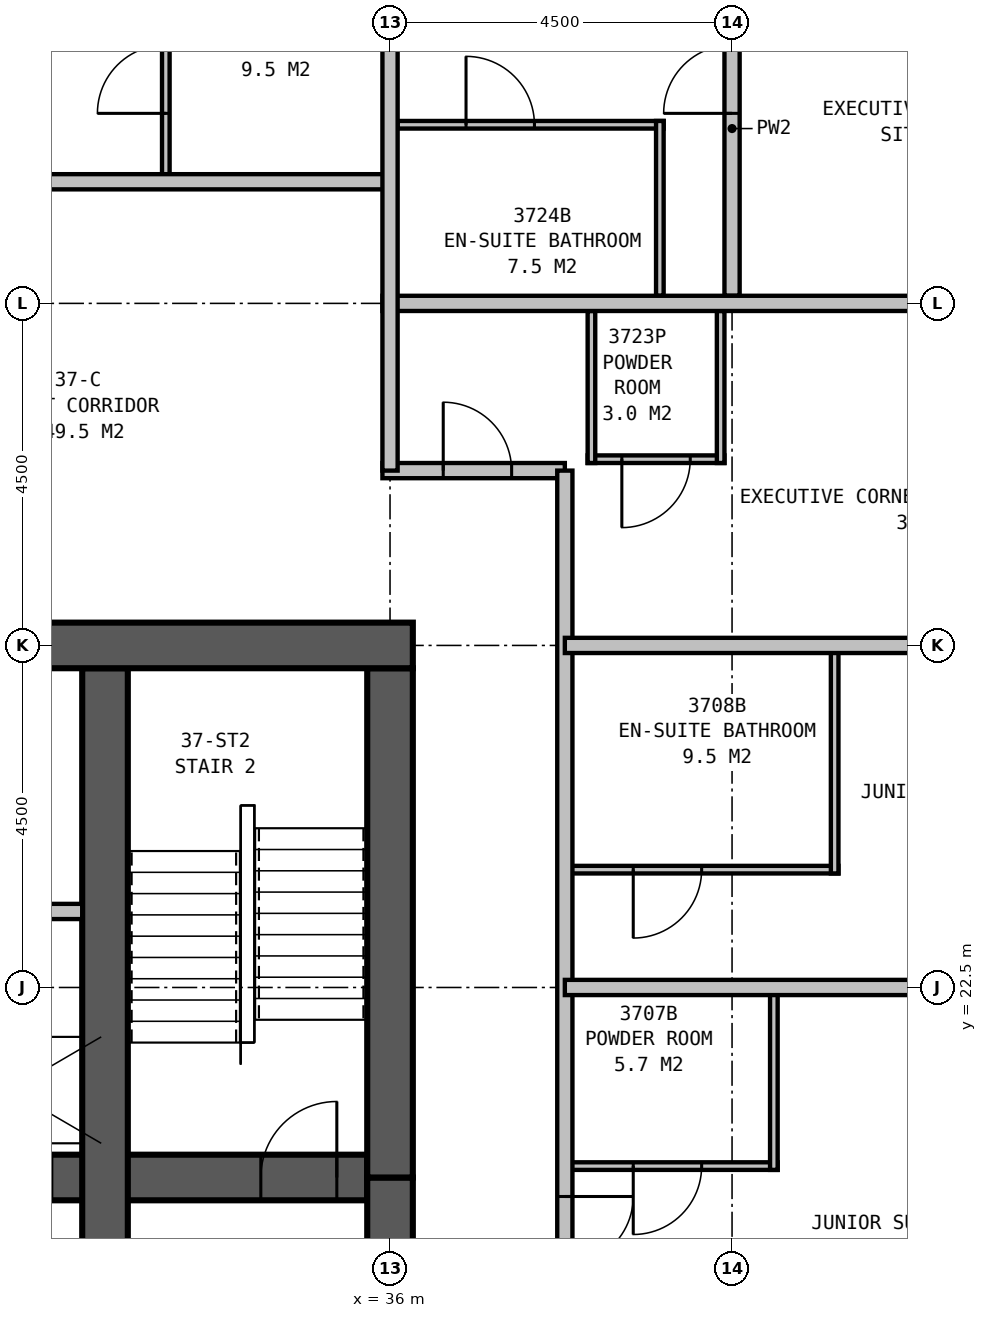
"""IFC4 building model, lengths in metres.
Left out: names, types, materials, properties, quantities, classifications, styles, units other than length and angle.
Written with IfcOpenShell. Run it as: python <this file> out.ifc"""

import sys

from ifc_helpers import new_model, si_unit, direction, frame, frame_2d, origin, place, context, subcontext, project, spatial, rectangle, extrude, element, fill, save


model = new_model("IFC4")
c1 = context("Model", 3, precision=1e-05, world=origin(), true_north=direction((0.0, 1.0)))
c2 = subcontext(c1, "Body", "Model", "MODEL_VIEW")
j1 = project(units=[si_unit("LENGTHUNIT", "METRE"), si_unit("PLANEANGLEUNIT", "RADIAN")], contexts=[c1])
p1 = place(None, origin())
s1 = spatial("IfcSite", under=j1, at=p1, CompositionType="ELEMENT")
p2 = place(p1, origin())
s2 = spatial("IfcBuilding", under=s1, at=p2, CompositionType="ELEMENT")
p3 = place(p2, frame((0.0, 0.0, 142.4)))
s3 = spatial("IfcBuildingStorey", under=s2, at=p3, CompositionType="ELEMENT", Elevation=142.4)
p4 = place(p3, frame((36.3, 27.0, 0.0), z_axis=(0.0, 0.0, 1.0), x_axis=(-1.0, 0.0, 0.0)))
e1 = element("IfcWall", 1, at=p4, inside=s3, PredefinedType="SHEAR", context=c2, shape_type="SweptSolid", body=[
    extrude(rectangle(XDim=23.1, YDim=0.6, at=frame_2d((11.55, 0.0))), origin(), (0.0, 0.0, 1.0), 3.5),
])
p5 = place(p4, frame((17.05, 0.0, 0.0)))
e2 = element("IfcOpeningElement", 2, at=p5, cuts=e1, PredefinedType="OPENING", context=c2, shape_type="SweptSolid", body=[
    extrude(rectangle(XDim=1.0, YDim=2.1, at=frame_2d((0.5, 1.05))), frame((0.0, 0.31, 0.0), z_axis=(0.0, -1.0, 0.0), x_axis=(1.0, 0.0, 0.0)), (0.0, 0.0, 1.0), 0.62),
])
p6 = place(p4, frame((12.05, 0.0, 0.0)))
e3 = element("IfcOpeningElement", 3, at=p6, cuts=e1, PredefinedType="OPENING", context=c2, shape_type="SweptSolid", body=[
    extrude(rectangle(XDim=1.0, YDim=2.1, at=frame_2d((0.5, 1.05))), frame((0.0, 0.31, 0.0), z_axis=(0.0, -1.0, 0.0), x_axis=(1.0, 0.0, 0.0)), (0.0, 0.0, 1.0), 0.62),
])
p7 = place(p4, frame((7.05, 0.0, 0.0)))
e4 = element("IfcOpeningElement", 4, at=p7, cuts=e1, PredefinedType="OPENING", context=c2, shape_type="SweptSolid", body=[
    extrude(rectangle(XDim=1.0, YDim=2.1, at=frame_2d((0.5, 1.05))), frame((0.0, 0.31, 0.0), z_axis=(0.0, -1.0, 0.0), x_axis=(1.0, 0.0, 0.0)), (0.0, 0.0, 1.0), 0.62),
])
p8 = place(p3, frame((32.25, 13.8, 0.0), z_axis=(0.0, 0.0, 1.0), x_axis=(0.0, 1.0, 0.0)))
e5 = element("IfcWall", 5, at=p8, inside=s3, PredefinedType="SHEAR", context=c2, shape_type="SweptSolid", body=[
    extrude(rectangle(XDim=12.9, YDim=0.6, at=frame_2d((6.45, 0.0))), origin(), (0.0, 0.0, 1.0), 3.5),
])
p9 = place(p8, frame((5.05, 0.0, 0.0), z_axis=(0.0, 0.0, 1.0), x_axis=(-1.0, 0.0, 0.0)))
e6 = element("IfcOpeningElement", 6, at=p9, cuts=e5, PredefinedType="OPENING", context=c2, shape_type="SweptSolid", body=[
    extrude(rectangle(XDim=1.2, YDim=2.1, at=frame_2d((0.6, 1.05))), frame((0.0, 0.31, 0.0), z_axis=(0.0, -1.0, 0.0), x_axis=(1.0, 0.0, 0.0)), (0.0, 0.0, 1.0), 0.62),
])
p10 = place(p3, frame((13.8, 20.0, 0.0), z_axis=(0.0, 0.0, 1.0), x_axis=(1.0, 0.0, 0.0)))
e7 = element("IfcWall", 7, at=p10, inside=s3, PredefinedType="SHEAR", context=c2, shape_type="SweptSolid", body=[
    extrude(rectangle(XDim=21.9, YDim=0.6, at=frame_2d((10.95, 0.0))), origin(), (0.0, 0.0, 1.0), 3.5),
])
p11 = place(p10, frame((0.5, 0.0, 0.0)))
e8 = element("IfcOpeningElement", 8, at=p11, cuts=e7, PredefinedType="OPENING", context=c2, shape_type="SweptSolid", body=[
    extrude(rectangle(XDim=1.0, YDim=2.1, at=frame_2d((0.5, 1.05))), frame((0.0, 0.31, 0.0), z_axis=(0.0, -1.0, 0.0), x_axis=(1.0, 0.0, 0.0)), (0.0, 0.0, 1.0), 0.62),
])
p12 = place(p10, frame((20.5, 0.0, 0.0)))
e9 = element("IfcOpeningElement", 9, at=p12, cuts=e7, PredefinedType="OPENING", context=c2, shape_type="SweptSolid", body=[
    extrude(rectangle(XDim=1.0, YDim=2.1, at=frame_2d((0.5, 1.05))), frame((0.0, 0.31, 0.0), z_axis=(0.0, -1.0, 0.0), x_axis=(1.0, 0.0, 0.0)), (0.0, 0.0, 1.0), 0.62),
])
p13 = place(p10, frame((16.65, 0.0, 0.0)))
e10 = element("IfcOpeningElement", 10, at=p13, cuts=e7, PredefinedType="OPENING", context=c2, shape_type="SweptSolid", body=[
    extrude(rectangle(XDim=1.1, YDim=2.1, at=frame_2d((0.55, 1.05))), frame((0.0, 0.31, 0.0), z_axis=(0.0, -1.0, 0.0), x_axis=(1.0, 0.0, 0.0)), (0.0, 0.0, 1.0), 0.62),
])
p14 = place(p3, frame((36.0, 16.5, 0.0), z_axis=(0.0, 0.0, 1.0), x_axis=(0.0, 1.0, 0.0)))
e11 = element("IfcWall", 11, at=p14, inside=s3, PredefinedType="SHEAR", context=c2, shape_type="SweptSolid", body=[
    extrude(rectangle(XDim=3.5, YDim=0.6, at=frame_2d((1.75, 0.0))), origin(), (0.0, 0.0, 1.0), 3.5),
])
p15 = place(p14, frame((0.65, 0.0, 0.0)))
e12 = element("IfcOpeningElement", 12, at=p15, cuts=e11, PredefinedType="OPENING", context=c2, shape_type="SweptSolid", body=[
    extrude(rectangle(XDim=1.2, YDim=2.1, at=frame_2d((0.6, 1.05))), frame((0.0, 0.31, 0.0), z_axis=(0.0, -1.0, 0.0), x_axis=(1.0, 0.0, 0.0)), (0.0, 0.0, 1.0), 0.62),
])
p16 = place(p3, frame((36.0, 20.0, 0.0), z_axis=(0.0, 0.0, 1.0), x_axis=(0.0, 1.0, 0.0)))
e13 = element("IfcWall", 13, at=p16, inside=s3, PredefinedType="SHEAR", context=c2, shape_type="SweptSolid", body=[
    extrude(rectangle(XDim=6.7, YDim=0.6, at=frame_2d((3.35, 0.0))), origin(), (0.0, 0.0, 1.0), 3.5),
])
p17 = place(p3, frame((13.5, 33.1, 0.0), z_axis=(0.0, 0.0, 1.0), x_axis=(1.0, 0.0, 0.0)))
e14 = element("IfcWall", 14, at=p17, inside=s3, PredefinedType="PARTITIONING", context=c2, shape_type="SweptSolid", body=[
    extrude(rectangle(XDim=22.5, YDim=0.2, at=frame_2d((11.25, 0.0))), origin(), (0.0, 0.0, 1.0), 3.25),
])
p18 = place(p17, frame((0.85, 0.0, 0.0)))
e15 = element("IfcOpeningElement", 15, at=p18, cuts=e14, PredefinedType="OPENING", context=c2, shape_type="SweptSolid", body=[
    extrude(rectangle(XDim=0.9, YDim=2.1, at=frame_2d((0.45, 1.05))), frame((0.0, 0.11, 0.0), z_axis=(0.0, -1.0, 0.0), x_axis=(1.0, 0.0, 0.0)), (0.0, 0.0, 1.0), 0.22),
])
p19 = place(p17, frame((10.7, 0.0, 0.0)))
e16 = element("IfcOpeningElement", 16, at=p19, cuts=e14, PredefinedType="OPENING", context=c2, shape_type="SweptSolid", body=[
    extrude(rectangle(XDim=1.0, YDim=2.1, at=frame_2d((0.5, 1.05))), frame((0.0, 0.11, 0.0), z_axis=(0.0, -1.0, 0.0), x_axis=(1.0, 0.0, 0.0)), (0.0, 0.0, 1.0), 0.22),
])
p20 = place(p17, frame((15.15, 0.0, 0.0)))
e17 = element("IfcOpeningElement", 17, at=p20, cuts=e14, PredefinedType="OPENING", context=c2, shape_type="SweptSolid", body=[
    extrude(rectangle(XDim=0.9, YDim=2.1, at=frame_2d((0.45, 1.05))), frame((0.0, 0.11, 0.0), z_axis=(0.0, -1.0, 0.0), x_axis=(1.0, 0.0, 0.0)), (0.0, 0.0, 1.0), 0.22),
])
p21 = place(p3, frame((35.9, 29.3, 0.0), z_axis=(0.0, 0.0, 1.0), x_axis=(1.0, 0.0, 0.0)))
e18 = element("IfcWall", 18, at=p21, inside=s3, PredefinedType="PARTITIONING", context=c2, shape_type="SweptSolid", body=[
    extrude(rectangle(XDim=2.4, YDim=0.2, at=frame_2d((1.2, 0.0))), origin(), (0.0, 0.0, 1.0), 3.25),
])
p22 = place(p21, frame((0.8, 0.0, 0.0)))
e19 = element("IfcOpeningElement", 19, at=p22, cuts=e18, PredefinedType="OPENING", context=c2, shape_type="SweptSolid", body=[
    extrude(rectangle(XDim=0.9, YDim=2.1, at=frame_2d((0.45, 1.05))), frame((0.0, 0.11, 0.0), z_axis=(0.0, -1.0, 0.0), x_axis=(1.0, 0.0, 0.0)), (0.0, 0.0, 1.0), 0.22),
])
p23 = place(p3, frame((38.3, 11.2, 0.0), z_axis=(0.0, 0.0, 1.0), x_axis=(0.0, 1.0, 0.0)))
e20 = element("IfcWall", 20, at=p23, inside=s3, PredefinedType="PARTITIONING", context=c2, shape_type="SweptSolid", body=[
    extrude(rectangle(XDim=18.1, YDim=0.2, at=frame_2d((9.05, 0.0))), origin(), (0.0, 0.0, 1.0), 3.25),
])
p24 = place(p23, frame((5.0, 0.0, 0.0), z_axis=(0.0, 0.0, 1.0), x_axis=(-1.0, 0.0, 0.0)))
e21 = element("IfcOpeningElement", 21, at=p24, cuts=e20, PredefinedType="OPENING", context=c2, shape_type="SweptSolid", body=[
    extrude(rectangle(XDim=1.0, YDim=2.1, at=frame_2d((0.5, 1.05))), frame((0.0, 0.11, 0.0), z_axis=(0.0, -1.0, 0.0), x_axis=(1.0, 0.0, 0.0)), (0.0, 0.0, 1.0), 0.22),
])
p25 = place(p23, frame((8.55, 0.0, 0.0), z_axis=(0.0, 0.0, 1.0), x_axis=(-1.0, 0.0, 0.0)))
e22 = element("IfcOpeningElement", 22, at=p25, cuts=e20, PredefinedType="OPENING", context=c2, shape_type="SweptSolid", body=[
    extrude(rectangle(XDim=0.9, YDim=2.1, at=frame_2d((0.45, 1.05))), frame((0.0, 0.11, 0.0), z_axis=(0.0, -1.0, 0.0), x_axis=(1.0, 0.0, 0.0)), (0.0, 0.0, 1.0), 0.22),
])
p26 = place(p3, frame((38.3, 22.5, 0.0), z_axis=(0.0, 0.0, 1.0), x_axis=(1.0, 0.0, 0.0)))
e23 = element("IfcWall", 23, at=p26, inside=s3, PredefinedType="PARTITIONING", context=c2, shape_type="SweptSolid", body=[
    extrude(rectangle(XDim=8.699, YDim=0.2, at=frame_2d((4.35, 0.0))), origin(), (0.0, 0.0, 1.0), 2.2),
])
p27 = place(p26, frame((6.2, 0.0, 0.0)))
e24 = element("IfcOpeningElement", 24, at=p27, cuts=e23, PredefinedType="OPENING", context=c2, shape_type="SweptSolid", body=[
    extrude(rectangle(XDim=0.9, YDim=2.1, at=frame_2d((0.45, 1.05))), frame((0.0, 0.11, 0.0), z_axis=(0.0, -1.0, 0.0), x_axis=(1.0, 0.0, 0.0)), (0.0, 0.0, 1.0), 0.22),
])
p28 = place(p3, frame((41.05, 20.1, 0.0), z_axis=(0.0, 0.0, 1.0), x_axis=(0.0, 1.0, 0.0)))
e25 = element("IfcWall", 25, at=p28, inside=s3, PredefinedType="PLUMBINGWALL", context=c2, shape_type="SweptSolid", body=[
    extrude(rectangle(XDim=2.4, YDim=0.1, at=frame_2d((1.2, 0.0))), origin(), (0.0, 0.0, 1.0), 3.25),
])
p29 = place(p3, frame((38.3, 20.15, 0.0), z_axis=(0.0, 0.0, 1.0), x_axis=(1.0, 0.0, 0.0)))
e26 = element("IfcWall", 26, at=p29, inside=s3, PredefinedType="PLUMBINGWALL", context=c2, shape_type="SweptSolid", body=[
    extrude(rectangle(XDim=2.8, YDim=0.1, at=frame_2d((1.4, 0.0))), origin(), (0.0, 0.0, 1.0), 3.25),
])
p30 = place(p29, frame((1.8, 0.0, 0.0), z_axis=(0.0, 0.0, 1.0), x_axis=(-1.0, 0.0, 0.0)))
e27 = element("IfcOpeningElement", 27, at=p30, cuts=e26, PredefinedType="OPENING", context=c2, shape_type="SweptSolid", body=[
    extrude(rectangle(XDim=0.9, YDim=2.1, at=frame_2d((0.45, 1.05))), frame((0.0, 0.06, 0.0), z_axis=(0.0, -1.0, 0.0), x_axis=(1.0, 0.0, 0.0)), (0.0, 0.0, 1.0), 0.12),
])
p31 = place(p3, frame((41.85, 24.0, 0.0), z_axis=(0.0, 0.0, 1.0), x_axis=(0.0, 1.0, 0.0)))
e28 = element("IfcWall", 28, at=p31, inside=s3, PredefinedType="PLUMBINGWALL", context=c2, shape_type="SweptSolid", body=[
    extrude(rectangle(XDim=3.0, YDim=0.1, at=frame_2d((1.5, 0.0))), origin(), (0.0, 0.0, 1.0), 3.25),
])
p32 = place(p3, frame((38.3, 24.05, 0.0), z_axis=(0.0, 0.0, 1.0), x_axis=(1.0, 0.0, 0.0)))
e29 = element("IfcWall", 29, at=p32, inside=s3, PredefinedType="PLUMBINGWALL", context=c2, shape_type="SweptSolid", body=[
    extrude(rectangle(XDim=3.6, YDim=0.1, at=frame_2d((1.8, 0.0))), origin(), (0.0, 0.0, 1.0), 3.25),
])
p33 = place(p32, frame((1.8, 0.0, 0.0), z_axis=(0.0, 0.0, 1.0), x_axis=(-1.0, 0.0, 0.0)))
e30 = element("IfcOpeningElement", 30, at=p33, cuts=e29, PredefinedType="OPENING", context=c2, shape_type="SweptSolid", body=[
    extrude(rectangle(XDim=0.9, YDim=2.1, at=frame_2d((0.45, 1.05))), frame((0.0, 0.06, 0.0), z_axis=(0.0, -1.0, 0.0), x_axis=(1.0, 0.0, 0.0)), (0.0, 0.0, 1.0), 0.12),
])
p34 = place(p3, frame((33.05, 33.1, 0.0), z_axis=(0.0, 0.0, 1.0), x_axis=(0.0, 1.0, 0.0)))
e31 = element("IfcWall", 31, at=p34, inside=s3, PredefinedType="PLUMBINGWALL", context=c2, shape_type="SweptSolid", body=[
    extrude(rectangle(XDim=3.6, YDim=0.1, at=frame_2d((1.8, 0.0))), origin(), (0.0, 0.0, 1.0), 3.25),
])
p35 = place(p34, frame((0.9, 0.0, 0.0)))
e32 = element("IfcOpeningElement", 32, at=p35, cuts=e31, PredefinedType="OPENING", context=c2, shape_type="SweptSolid", body=[
    extrude(rectangle(XDim=0.9, YDim=2.1, at=frame_2d((0.45, 1.05))), frame((0.0, 0.06, 0.0), z_axis=(0.0, -1.0, 0.0), x_axis=(1.0, 0.0, 0.0)), (0.0, 0.0, 1.0), 0.12),
])
p36 = place(p3, frame((38.3, 27.0, 0.0), z_axis=(0.0, 0.0, 1.0), x_axis=(1.0, 0.0, 0.0)))
e33 = element("IfcWall", 33, at=p36, inside=s3, PredefinedType="PARTITIONING", context=c2, shape_type="SweptSolid", body=[
    extrude(rectangle(XDim=7.977, YDim=0.2, at=frame_2d((3.988, 0.0))), origin(), (0.0, 0.0, 1.0), 1.9),
])
p37 = place(p3, frame((36.0, 29.3, 0.0), z_axis=(0.0, 0.0, 1.0), x_axis=(0.0, 1.0, 0.0)))
e34 = element("IfcWall", 34, at=p37, inside=s3, PredefinedType="PARTITIONING", context=c2, shape_type="SweptSolid", body=[
    extrude(rectangle(XDim=11.2, YDim=0.2, at=frame_2d((5.6, 0.0))), origin(), (0.0, 0.0, 1.0), 2.2),
])
p38 = place(p3, frame((35.9, 31.5, 0.0), z_axis=(0.0, 0.0, 1.0), x_axis=(1.0, 0.0, 0.0)))
e35 = element("IfcWall", 35, at=p38, inside=s3, PredefinedType="PARTITIONING", context=c2, shape_type="SweptSolid", body=[
    extrude(rectangle(XDim=10.099, YDim=0.2, at=frame_2d((5.05, 0.0))), origin(), (0.0, 0.0, 1.0), 3.25),
])
p39 = place(p38, frame((8.099, 0.0, 0.0)))
e36 = element("IfcOpeningElement", 36, at=p39, cuts=e35, PredefinedType="OPENING", context=c2, shape_type="SweptSolid", body=[
    extrude(rectangle(XDim=0.9, YDim=2.1, at=frame_2d((0.45, 1.05))), frame((0.0, 0.11, 0.0), z_axis=(0.0, -1.0, 0.0), x_axis=(1.0, 0.0, 0.0)), (0.0, 0.0, 1.0), 0.22),
])
p40 = place(p3, frame((40.35, 31.4, 0.0), z_axis=(0.0, 0.0, 1.0), x_axis=(0.0, -1.0, 0.0)))
e37 = element("IfcWall", 37, at=p40, inside=s3, PredefinedType="PLUMBINGWALL", context=c2, shape_type="SweptSolid", body=[
    extrude(rectangle(XDim=2.0, YDim=0.1, at=frame_2d((1.0, 0.0))), origin(), (0.0, 0.0, 1.0), 2.2),
])
p41 = place(p3, frame((38.65, 31.4, 0.0), z_axis=(0.0, 0.0, 1.0), x_axis=(0.0, -1.0, 0.0)))
e38 = element("IfcWall", 38, at=p41, inside=s3, PredefinedType="PLUMBINGWALL", context=c2, shape_type="SweptSolid", body=[
    extrude(rectangle(XDim=2.0, YDim=0.1, at=frame_2d((1.0, 0.0))), origin(), (0.0, 0.0, 1.0), 3.25),
])
p42 = place(p3, frame((38.6, 29.45, 0.0), z_axis=(0.0, 0.0, 1.0), x_axis=(1.0, 0.0, 0.0)))
e39 = element("IfcWall", 39, at=p42, inside=s3, PredefinedType="PLUMBINGWALL", context=c2, shape_type="SweptSolid", body=[
    extrude(rectangle(XDim=1.8, YDim=0.1, at=frame_2d((0.9, 0.0))), origin(), (0.0, 0.0, 1.0), 3.25),
])
p43 = place(p42, frame((1.35, 0.0, 0.0), z_axis=(0.0, 0.0, 1.0), x_axis=(-1.0, 0.0, 0.0)))
e40 = element("IfcOpeningElement", 40, at=p43, cuts=e39, PredefinedType="OPENING", context=c2, shape_type="SweptSolid", body=[
    extrude(rectangle(XDim=0.9, YDim=2.1, at=frame_2d((0.45, 1.05))), frame((0.0, 0.06, 0.0), z_axis=(0.0, -1.0, 0.0), x_axis=(1.0, 0.0, 0.0)), (0.0, 0.0, 1.0), 0.12),
])
p44 = place(p3, frame((40.5, 31.6, 0.0), z_axis=(0.0, 0.0, 1.0), x_axis=(0.0, 1.0, 0.0)))
e41 = element("IfcWall", 41, at=p44, inside=s3, PredefinedType="PARTITIONING", context=c2, shape_type="SweptSolid", body=[
    extrude(rectangle(XDim=4.4, YDim=0.2, at=frame_2d((2.2, 0.0))), origin(), (0.0, 0.0, 1.0), 2.2),
])
p45 = place(p44, frame((2.4, 0.0, 0.0)))
e42 = element("IfcOpeningElement", 42, at=p45, cuts=e41, PredefinedType="OPENING", context=c2, shape_type="SweptSolid", body=[
    extrude(rectangle(XDim=0.9, YDim=2.1, at=frame_2d((0.45, 1.05))), frame((0.0, 0.11, 0.0), z_axis=(0.0, -1.0, 0.0), x_axis=(1.0, 0.0, 0.0)), (0.0, 0.0, 1.0), 0.22),
])
p46 = place(p3, frame((39.55, 31.6, 0.0), z_axis=(0.0, 0.0, 1.0), x_axis=(0.0, 1.0, 0.0)))
e43 = element("IfcWall", 43, at=p46, inside=s3, PredefinedType="PLUMBINGWALL", context=c2, shape_type="SweptSolid", body=[
    extrude(rectangle(XDim=2.3, YDim=0.1, at=frame_2d((1.15, 0.0))), origin(), (0.0, 0.0, 1.0), 3.25),
])
p47 = place(p3, frame((36.1, 33.85, 0.0), z_axis=(0.0, 0.0, 1.0), x_axis=(1.0, 0.0, 0.0)))
e44 = element("IfcWall", 44, at=p47, inside=s3, PredefinedType="PLUMBINGWALL", context=c2, shape_type="SweptSolid", body=[
    extrude(rectangle(XDim=3.5, YDim=0.1, at=frame_2d((1.75, 0.0))), origin(), (0.0, 0.0, 1.0), 3.25),
])
p48 = place(p47, frame((0.9, 0.0, 0.0)))
e45 = element("IfcOpeningElement", 45, at=p48, cuts=e44, PredefinedType="OPENING", context=c2, shape_type="SweptSolid", body=[
    extrude(rectangle(XDim=0.9, YDim=2.1, at=frame_2d((0.45, 1.05))), frame((0.0, 0.06, 0.0), z_axis=(0.0, -1.0, 0.0), x_axis=(1.0, 0.0, 0.0)), (0.0, 0.0, 1.0), 0.12),
])
p49 = place(p3, frame((17.55, 23.5, 0.0), z_axis=(0.0, 0.0, 1.0), x_axis=(1.0, 0.0, 0.0)))
e46 = element("IfcWall", 46, at=p49, inside=s3, PredefinedType="PARTITIONING", context=c2, shape_type="SweptSolid", body=[
    extrude(rectangle(XDim=14.4, YDim=0.2, at=frame_2d((7.2, 0.0))), origin(), (0.0, 0.0, 1.0), 3.25),
])
p50 = place(p22, origin())
e47 = element("IfcDoor", 47, at=p50, inside=s3, OperationType="SINGLE_SWING_LEFT", PredefinedType="DOOR", context=c2, shape_type="SweptSolid", body=[
    extrude(rectangle(XDim=0.9, YDim=2.1, at=frame_2d((0.45, 1.05))), frame((0.0, 0.025, 0.0), z_axis=(0.0, -1.0, 0.0), x_axis=(1.0, 0.0, 0.0)), (0.0, 0.0, 1.0), 0.05),
])
fill(e19, e47)
p51 = place(p25, origin())
e48 = element("IfcDoor", 48, at=p51, inside=s3, OperationType="SINGLE_SWING_LEFT", PredefinedType="DOOR", context=c2, shape_type="SweptSolid", body=[
    extrude(rectangle(XDim=0.9, YDim=2.1, at=frame_2d((0.45, 1.05))), frame((0.0, 0.025, 0.0), z_axis=(0.0, -1.0, 0.0), x_axis=(1.0, 0.0, 0.0)), (0.0, 0.0, 1.0), 0.05),
])
fill(e22, e48)
p52 = place(p30, origin())
e49 = element("IfcDoor", 49, at=p52, inside=s3, OperationType="SINGLE_SWING_RIGHT", PredefinedType="DOOR", context=c2, shape_type="SweptSolid", body=[
    extrude(rectangle(XDim=0.9, YDim=2.1, at=frame_2d((0.45, 1.05))), frame((0.0, 0.025, 0.0), z_axis=(0.0, -1.0, 0.0), x_axis=(1.0, 0.0, 0.0)), (0.0, 0.0, 1.0), 0.05),
])
fill(e27, e49)
p53 = place(p33, origin())
e50 = element("IfcDoor", 50, at=p53, inside=s3, OperationType="SINGLE_SWING_RIGHT", PredefinedType="DOOR", context=c2, shape_type="SweptSolid", body=[
    extrude(rectangle(XDim=0.9, YDim=2.1, at=frame_2d((0.45, 1.05))), frame((0.0, 0.025, 0.0), z_axis=(0.0, -1.0, 0.0), x_axis=(1.0, 0.0, 0.0)), (0.0, 0.0, 1.0), 0.05),
])
fill(e30, e50)
p54 = place(p35, origin())
e51 = element("IfcDoor", 51, at=p54, inside=s3, OperationType="SINGLE_SWING_LEFT", PredefinedType="DOOR", context=c2, shape_type="SweptSolid", body=[
    extrude(rectangle(XDim=0.9, YDim=2.1, at=frame_2d((0.45, 1.05))), frame((0.0, 0.025, 0.0), z_axis=(0.0, -1.0, 0.0), x_axis=(1.0, 0.0, 0.0)), (0.0, 0.0, 1.0), 0.05),
])
fill(e32, e51)
p55 = place(p43, origin())
e52 = element("IfcDoor", 52, at=p55, inside=s3, OperationType="SINGLE_SWING_RIGHT", PredefinedType="DOOR", context=c2, shape_type="SweptSolid", body=[
    extrude(rectangle(XDim=0.9, YDim=2.1, at=frame_2d((0.45, 1.05))), frame((0.0, 0.025, 0.0), z_axis=(0.0, -1.0, 0.0), x_axis=(1.0, 0.0, 0.0)), (0.0, 0.0, 1.0), 0.05),
])
fill(e40, e52)
p56 = place(p45, origin())
e53 = element("IfcDoor", 53, at=p56, inside=s3, OperationType="SINGLE_SWING_LEFT", PredefinedType="DOOR", context=c2, shape_type="SweptSolid", body=[
    extrude(rectangle(XDim=0.9, YDim=2.1, at=frame_2d((0.45, 1.05))), frame((0.0, 0.025, 0.0), z_axis=(0.0, -1.0, 0.0), x_axis=(1.0, 0.0, 0.0)), (0.0, 0.0, 1.0), 0.05),
])
fill(e42, e53)
p57 = place(p48, origin())
e54 = element("IfcDoor", 54, at=p57, inside=s3, OperationType="SINGLE_SWING_LEFT", PredefinedType="DOOR", context=c2, shape_type="SweptSolid", body=[
    extrude(rectangle(XDim=0.9, YDim=2.1, at=frame_2d((0.45, 1.05))), frame((0.0, 0.025, 0.0), z_axis=(0.0, -1.0, 0.0), x_axis=(1.0, 0.0, 0.0)), (0.0, 0.0, 1.0), 0.05),
])
fill(e45, e54)
p58 = place(p12, origin())
e55 = element("IfcDoor", 55, at=p58, inside=s3, OperationType="SINGLE_SWING_RIGHT", PredefinedType="DOOR", context=c2, shape_type="SweptSolid", body=[
    extrude(rectangle(XDim=1.0, YDim=2.1, at=frame_2d((0.5, 1.05))), frame((0.0, 0.3, 0.0), z_axis=(0.0, -1.0, 0.0), x_axis=(1.0, 0.0, 0.0)), (0.0, 0.0, 1.0), 0.6),
])
fill(e9, e55)
save(model, sys.argv[1])
